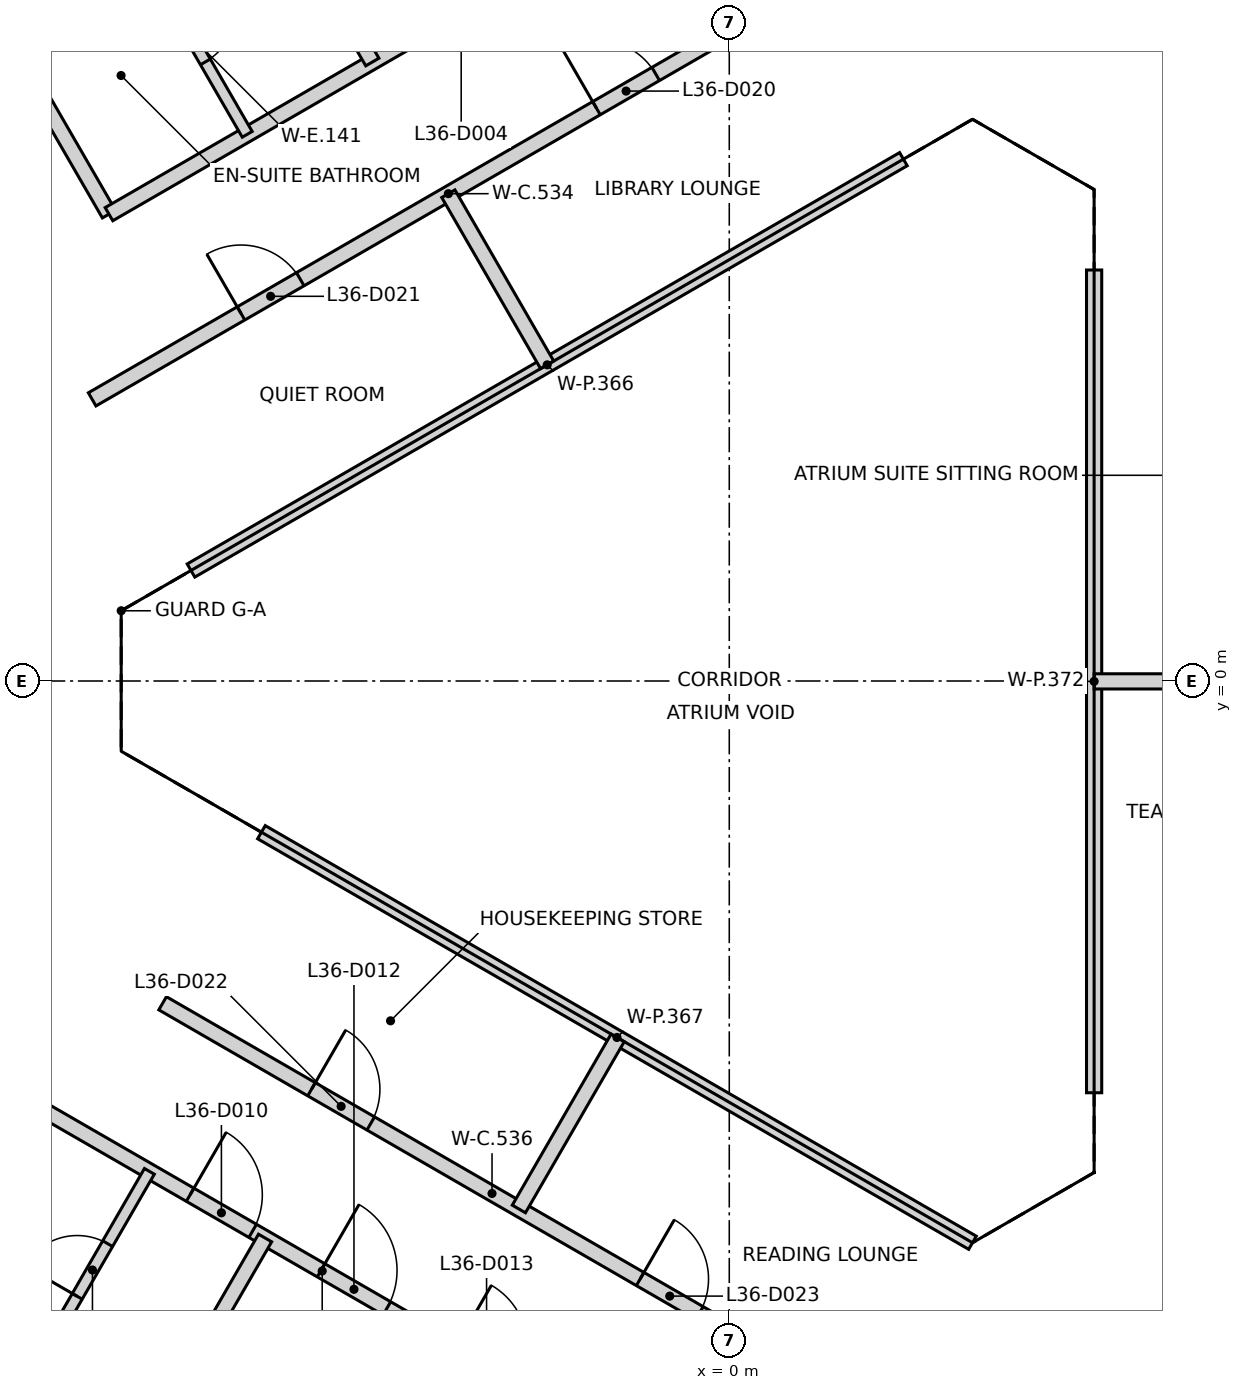
"""IFC4 building model, lengths in metres.
Left out: names, types, materials, properties, quantities, classifications, styles, units other than length and angle.
Written with IfcOpenShell. Run it as: python <this file> out.ifc"""

import sys

from ifc_helpers import new_model, si_unit, direction, frame, frame_2d, origin, place, context, subcontext, project, spatial, rectangle, extrude, element, fill, save


model = new_model("IFC4")
c1 = context("Model", 3, precision=1e-05, world=origin(), true_north=direction((0.0, 1.0)))
c2 = subcontext(c1, "Body", "Model", "MODEL_VIEW")
j1 = project(units=[si_unit("LENGTHUNIT", "METRE"), si_unit("PLANEANGLEUNIT", "RADIAN")], contexts=[c1])
p1 = place(None, origin())
s1 = spatial("IfcSite", under=j1, at=p1, CompositionType="ELEMENT")
p2 = place(p1, origin())
s2 = spatial("IfcBuilding", under=s1, at=p2, CompositionType="ELEMENT")
p3 = place(p2, frame((0.0, 0.0, 146.8)))
s3 = spatial("IfcBuildingStorey", under=s2, at=p3, CompositionType="ELEMENT", Elevation=146.8)
p4 = place(p3, frame((10.42, 6.498, 0.0), z_axis=(0.0, 0.0, 1.0), x_axis=(-0.866021906294, 0.500006057782, 0.0)))
e1 = element("IfcWall", 1, at=p4, inside=s3, PredefinedType="SHEAR", context=c2, shape_type="SweptSolid", body=[
    extrude(rectangle(XDim=11.55, YDim=0.25, at=frame_2d((5.775, 0.0))), origin(), (0.0, 0.0, 1.0), 3.2),
])
p5 = place(p4, frame((10.025, 0.0, 0.0)))
e2 = element("IfcOpeningElement", 2, at=p5, cuts=e1, PredefinedType="OPENING", context=c2, shape_type="SweptSolid", body=[
    extrude(rectangle(XDim=1.2, YDim=2.1, at=frame_2d((0.6, 1.05))), frame((0.0, 0.135, 0.0), z_axis=(0.0, -1.0, 0.0), x_axis=(1.0, 0.0, 0.0)), (0.0, 0.0, 1.0), 0.27),
])
p6 = place(p4, frame((8.725, 0.0, 0.0)))
e3 = element("IfcOpeningElement", 3, at=p6, cuts=e1, PredefinedType="OPENING", context=c2, shape_type="SweptSolid", body=[
    extrude(rectangle(XDim=1.2, YDim=2.1, at=frame_2d((0.6, 1.05))), frame((0.0, 0.135, 0.0), z_axis=(0.0, -1.0, 0.0), x_axis=(1.0, 0.0, 0.0)), (0.0, 0.0, 1.0), 0.27),
])
p7 = place(p3, frame((0.417, -12.273, 0.0), z_axis=(0.0, 0.0, 1.0), x_axis=(0.866021906294, 0.500006057782, 0.0)))
e4 = element("IfcWall", 4, at=p7, inside=s3, PredefinedType="SHEAR", context=c2, shape_type="SweptSolid", body=[
    extrude(rectangle(XDim=11.55, YDim=0.25, at=frame_2d((5.775, 0.0))), origin(), (0.0, 0.0, 1.0), 3.2),
])
p8 = place(p7, frame((10.025, 0.0, 0.0)))
e5 = element("IfcOpeningElement", 5, at=p8, cuts=e4, PredefinedType="OPENING", context=c2, shape_type="SweptSolid", body=[
    extrude(rectangle(XDim=1.2, YDim=2.1, at=frame_2d((0.6, 1.05))), frame((0.0, 0.135, 0.0), z_axis=(0.0, -1.0, 0.0), x_axis=(1.0, 0.0, 0.0)), (0.0, 0.0, 1.0), 0.27),
])
p9 = place(p7, frame((8.725, 0.0, 0.0)))
e6 = element("IfcOpeningElement", 6, at=p9, cuts=e4, PredefinedType="OPENING", context=c2, shape_type="SweptSolid", body=[
    extrude(rectangle(XDim=1.2, YDim=2.1, at=frame_2d((0.6, 1.05))), frame((0.0, 0.135, 0.0), z_axis=(0.0, -1.0, 0.0), x_axis=(1.0, 0.0, 0.0)), (0.0, 0.0, 1.0), 0.27),
])
p10 = place(p3, frame((-9.447, -5.4, 0.0), z_axis=(0.0, 0.0, 1.0), x_axis=(0.866101262146, -0.49986858644, 0.0)))
e7 = element("IfcWall", 7, at=p10, inside=s3, PredefinedType="PARTITIONING", context=c2, shape_type="SweptSolid", body=[
    extrude(rectangle(XDim=9.449, YDim=0.2, at=frame_2d((4.724, 0.0))), origin(), (0.0, 0.0, 1.0), 3.2),
])
p11 = place(p10, frame((2.718, 0.0, 0.0)))
e8 = element("IfcOpeningElement", 8, at=p11, cuts=e7, PredefinedType="OPENING", context=c2, shape_type="SweptSolid", body=[
    extrude(rectangle(XDim=0.95, YDim=2.1, at=frame_2d((0.475, 1.05))), frame((0.0, 0.11, 0.0), z_axis=(0.0, -1.0, 0.0), x_axis=(1.0, 0.0, 0.0)), (0.0, 0.0, 1.0), 0.22),
])
p12 = place(p10, frame((4.707, 0.0, 0.0)))
e9 = element("IfcOpeningElement", 9, at=p12, cuts=e7, PredefinedType="OPENING", context=c2, shape_type="SweptSolid", body=[
    extrude(rectangle(XDim=1.0, YDim=2.1, at=frame_2d((0.5, 1.05))), frame((0.0, 0.11, 0.0), z_axis=(0.0, -1.0, 0.0), x_axis=(1.0, 0.0, 0.0)), (0.0, 0.0, 1.0), 0.22),
])
p13 = place(p10, frame((6.746, 0.0, 0.0)))
e10 = element("IfcOpeningElement", 10, at=p13, cuts=e7, PredefinedType="OPENING", context=c2, shape_type="SweptSolid", body=[
    extrude(rectangle(XDim=0.95, YDim=2.1, at=frame_2d((0.475, 1.05))), frame((0.0, 0.11, 0.0), z_axis=(0.0, -1.0, 0.0), x_axis=(1.0, 0.0, 0.0)), (0.0, 0.0, 1.0), 0.22),
])
p14 = place(p3, frame((-9.033, 7.651, 0.0), z_axis=(0.0, 0.0, 1.0), x_axis=(0.500417633986, -0.865784148386, 0.0)))
e11 = element("IfcWall", 11, at=p14, inside=s3, PredefinedType="PARTITIONING", context=c2, shape_type="SweptSolid", body=[
    extrude(rectangle(XDim=1.743, YDim=0.2, at=frame_2d((0.871, 0.0))), origin(), (0.0, 0.0, 1.0), 3.2),
])
p15 = place(p3, frame((-8.382, 3.705, 0.0), z_axis=(0.0, 0.0, 1.0), x_axis=(0.866012036978, 0.500023151273, 0.0)))
e12 = element("IfcWall", 12, at=p15, inside=s3, PredefinedType="PARTITIONING", context=c2, shape_type="SweptSolid", body=[
    extrude(rectangle(XDim=10.823, YDim=0.2, at=frame_2d((5.412, 0.0))), origin(), (0.0, 0.0, 1.0), 3.2),
])
p16 = place(p15, frame((7.661, 0.0, 0.0)))
e13 = element("IfcOpeningElement", 13, at=p16, cuts=e12, PredefinedType="OPENING", context=c2, shape_type="SweptSolid", body=[
    extrude(rectangle(XDim=0.9, YDim=2.1, at=frame_2d((0.45, 1.05))), frame((0.0, 0.11, 0.0), z_axis=(0.0, -1.0, 0.0), x_axis=(1.0, 0.0, 0.0)), (0.0, 0.0, 1.0), 0.22),
])
p17 = place(p15, frame((2.261, 0.0, 0.0)))
e14 = element("IfcOpeningElement", 14, at=p17, cuts=e12, PredefinedType="OPENING", context=c2, shape_type="SweptSolid", body=[
    extrude(rectangle(XDim=0.9, YDim=2.1, at=frame_2d((0.45, 1.05))), frame((0.0, 0.11, 0.0), z_axis=(0.0, -1.0, 0.0), x_axis=(1.0, 0.0, 0.0)), (0.0, 0.0, 1.0), 0.22),
])
p18 = place(p3, frame((-8.161, 6.142, 0.0), z_axis=(0.0, 0.0, 1.0), x_axis=(0.865927304867, 0.500169873828, 0.0)))
e15 = element("IfcWall", 15, at=p18, inside=s3, PredefinedType="PARTITIONING", context=c2, shape_type="SweptSolid", body=[
    extrude(rectangle(XDim=9.478, YDim=0.2, at=frame_2d((4.739, 0.0))), origin(), (0.0, 0.0, 1.0), 3.2),
])
p19 = place(p18, frame((4.851, 0.0, 0.0)))
e16 = element("IfcOpeningElement", 16, at=p19, cuts=e15, PredefinedType="OPENING", context=c2, shape_type="SweptSolid", body=[
    extrude(rectangle(XDim=1.0, YDim=2.1, at=frame_2d((0.5, 1.05))), frame((0.0, 0.11, 0.0), z_axis=(0.0, -1.0, 0.0), x_axis=(1.0, 0.0, 0.0)), (0.0, 0.0, 1.0), 0.22),
])
p20 = place(p18, frame((7.583, 0.0, 0.0)))
e17 = element("IfcOpeningElement", 17, at=p20, cuts=e15, PredefinedType="OPENING", context=c2, shape_type="SweptSolid", body=[
    extrude(rectangle(XDim=1.0, YDim=2.1, at=frame_2d((0.5, 1.05))), frame((0.0, 0.11, 0.0), z_axis=(0.0, -1.0, 0.0), x_axis=(1.0, 0.0, 0.0)), (0.0, 0.0, 1.0), 0.22),
])
p21 = place(p3, frame((-7.455, -4.24, 0.0), z_axis=(0.0, 0.0, 1.0), x_axis=(0.866015783746, -0.500016662025, 0.0)))
e18 = element("IfcWall", 18, at=p21, inside=s3, PredefinedType="PARTITIONING", context=c2, shape_type="SweptSolid", body=[
    extrude(rectangle(XDim=10.009, YDim=0.2, at=frame_2d((5.004, 0.0))), origin(), (0.0, 0.0, 1.0), 3.2),
])
p22 = place(p21, frame((2.262, 0.0, 0.0)))
e19 = element("IfcOpeningElement", 19, at=p22, cuts=e18, PredefinedType="OPENING", context=c2, shape_type="SweptSolid", body=[
    extrude(rectangle(XDim=0.9, YDim=2.1, at=frame_2d((0.45, 1.05))), frame((0.0, 0.11, 0.0), z_axis=(0.0, -1.0, 0.0), x_axis=(1.0, 0.0, 0.0)), (0.0, 0.0, 1.0), 0.22),
])
p23 = place(p21, frame((7.254, 0.0, 0.0)))
e20 = element("IfcOpeningElement", 20, at=p23, cuts=e18, PredefinedType="OPENING", context=c2, shape_type="SweptSolid", body=[
    extrude(rectangle(XDim=0.9, YDim=2.1, at=frame_2d((0.45, 1.05))), frame((0.0, 0.11, 0.0), z_axis=(0.0, -1.0, 0.0), x_axis=(1.0, 0.0, 0.0)), (0.0, 0.0, 1.0), 0.22),
])
p24 = place(p3, frame((-12.22, -17.917, 0.0), z_axis=(0.0, 0.0, 1.0), x_axis=(0.499963860175, 0.866046268117, 0.0)))
e21 = element("IfcWall", 21, at=p24, inside=s3, PredefinedType="PARTITIONING", context=c2, shape_type="SweptSolid", body=[
    extrude(rectangle(XDim=12.227, YDim=0.2, at=frame_2d((6.114, 0.0))), origin(), (0.0, 0.0, 1.0), 2.3),
])
p25 = place(p3, frame((-10.809, 18.731, 0.0), z_axis=(0.0, 0.0, 1.0), x_axis=(0.500004774777, -0.866022647048, 0.0)))
e22 = element("IfcWall", 22, at=p25, inside=s3, PredefinedType="PARTITIONING", context=c2, shape_type="SweptSolid", body=[
    extrude(rectangle(XDim=12.227, YDim=0.2, at=frame_2d((6.113, 0.0))), origin(), (0.0, 0.0, 1.0), 2.3),
])
p26 = place(p3, frame((-7.082, 1.453, 0.0), z_axis=(0.0, 0.0, 1.0), x_axis=(0.866010525116, 0.500025769724, 0.0)))
e23 = element("IfcWall", 23, at=p26, inside=s3, PredefinedType="PARTITIONING", context=c2, shape_type="SweptSolid", body=[
    extrude(rectangle(XDim=10.823, YDim=0.2, at=frame_2d((5.411, 0.0))), origin(), (0.0, 0.0, 1.0), 2.3),
])
p27 = place(p3, frame((-6.155, -1.989, 0.0), z_axis=(0.0, 0.0, 1.0), x_axis=(0.866009062299, -0.500028303215, 0.0)))
e24 = element("IfcWall", 24, at=p27, inside=s3, PredefinedType="PARTITIONING", context=c2, shape_type="SweptSolid", body=[
    extrude(rectangle(XDim=10.802, YDim=0.2, at=frame_2d((5.401, 0.0))), origin(), (0.0, 0.0, 1.0), 2.3),
])
p28 = place(p3, frame((-3.696, 6.411, 0.0), z_axis=(0.0, 0.0, 1.0), x_axis=(0.500006934395, -0.866021400173, 0.0)))
e25 = element("IfcWall", 25, at=p28, inside=s3, PredefinedType="PARTITIONING", context=c2, shape_type="SweptSolid", body=[
    extrude(rectangle(XDim=2.6, YDim=0.2, at=frame_2d((1.3, 0.0))), origin(), (0.0, 0.0, 1.0), 2.3),
])
p29 = place(p3, frame((-2.768, -6.946, 0.0), z_axis=(0.0, 0.0, 1.0), x_axis=(0.500017832597, 0.866015107885, 0.0)))
e26 = element("IfcWall", 26, at=p29, inside=s3, PredefinedType="PARTITIONING", context=c2, shape_type="SweptSolid", body=[
    extrude(rectangle(XDim=2.6, YDim=0.2, at=frame_2d((1.3, 0.0))), origin(), (0.0, 0.0, 1.0), 2.3),
])
p30 = place(p3, frame((4.8, -5.417, 0.0), z_axis=(0.0, 0.0, 1.0), x_axis=(0.0, 1.0, 0.0)))
e27 = element("IfcWall", 27, at=p30, inside=s3, PredefinedType="PARTITIONING", context=c2, shape_type="SweptSolid", body=[
    extrude(rectangle(XDim=10.824, YDim=0.2, at=frame_2d((5.412, 0.0))), origin(), (0.0, 0.0, 1.0), 2.3),
])
p31 = place(p3, frame((4.8, -0.005, 0.0), z_axis=(0.0, 0.0, 1.0), x_axis=(1.0, 0.0, 0.0)))
e28 = element("IfcWall", 28, at=p31, inside=s3, PredefinedType="PARTITIONING", context=c2, shape_type="SweptSolid", body=[
    extrude(rectangle(XDim=2.505, YDim=0.2, at=frame_2d((1.252, 0.0))), origin(), (0.0, 0.0, 1.0), 2.3),
])
p32 = place(p3, frame((-9.127, -9.046, 0.0), z_axis=(0.0, 0.0, 1.0), x_axis=(0.499959910729, 0.866048548099, 0.0)))
e29 = element("IfcWall", 29, at=p32, inside=s3, PredefinedType="PARTITIONING", context=c2, shape_type="SweptSolid", body=[
    extrude(rectangle(XDim=2.996, YDim=0.15, at=frame_2d((1.498, 0.0))), origin(), (0.0, 0.0, 1.0), 3.2),
])
p33 = place(p32, frame((1.098, 0.0, 0.0)))
e30 = element("IfcOpeningElement", 30, at=p33, cuts=e29, PredefinedType="OPENING", context=c2, shape_type="SweptSolid", body=[
    extrude(rectangle(XDim=0.8, YDim=2.1, at=frame_2d((0.4, 1.05))), frame((0.0, 0.085, 0.0), z_axis=(0.0, -1.0, 0.0), x_axis=(1.0, 0.0, 0.0)), (0.0, 0.0, 1.0), 0.17),
])
p34 = place(p3, frame((-7.843, 9.79, 0.0), z_axis=(0.0, 0.0, 1.0), x_axis=(0.500234218456, -0.865890135459, 0.0)))
e31 = element("IfcWall", 31, at=p34, inside=s3, PredefinedType="PARTITIONING", context=c2, shape_type="SweptSolid", body=[
    extrude(rectangle(XDim=3.0, YDim=0.15, at=frame_2d((1.5, 0.0))), origin(), (0.0, 0.0, 1.0), 3.2),
])
p35 = place(p34, frame((1.1, 0.0, 0.0)))
e32 = element("IfcOpeningElement", 32, at=p35, cuts=e31, PredefinedType="OPENING", context=c2, shape_type="SweptSolid", body=[
    extrude(rectangle(XDim=0.8, YDim=2.1, at=frame_2d((0.4, 1.05))), frame((0.0, 0.085, 0.0), z_axis=(0.0, -1.0, 0.0), x_axis=(1.0, 0.0, 0.0)), (0.0, 0.0, 1.0), 0.17),
])
p36 = place(p35, frame((0.8, 0.0, 0.0), z_axis=(0.0, 0.0, 1.0), x_axis=(-1.0, 0.0, 0.0)))
e33 = element("IfcDoor", 33, at=p36, inside=s3, OperationType="SINGLE_SWING_LEFT", PredefinedType="DOOR", context=c2, shape_type="SweptSolid", body=[
    extrude(rectangle(XDim=0.8, YDim=2.1, at=frame_2d((0.4, 1.05))), frame((0.0, 0.025, 0.0), z_axis=(0.0, -1.0, 0.0), x_axis=(1.0, 0.0, 0.0)), (0.0, 0.0, 1.0), 0.05),
])
fill(e32, e33)
p37 = place(p11, frame((0.95, 0.0, 0.0), z_axis=(0.0, 0.0, 1.0), x_axis=(-1.0, 0.0, 0.0)))
e34 = element("IfcDoor", 34, at=p37, inside=s3, OperationType="SINGLE_SWING_LEFT", PredefinedType="DOOR", context=c2, shape_type="SweptSolid", body=[
    extrude(rectangle(XDim=0.95, YDim=2.1, at=frame_2d((0.475, 1.05))), frame((0.0, 0.025, 0.0), z_axis=(0.0, -1.0, 0.0), x_axis=(1.0, 0.0, 0.0)), (0.0, 0.0, 1.0), 0.05),
])
fill(e8, e34)
p38 = place(p33, origin())
e35 = element("IfcDoor", 35, at=p38, inside=s3, OperationType="SINGLE_SWING_LEFT", PredefinedType="DOOR", context=c2, shape_type="SweptSolid", body=[
    extrude(rectangle(XDim=0.8, YDim=2.1, at=frame_2d((0.4, 1.05))), frame((0.0, 0.025, 0.0), z_axis=(0.0, -1.0, 0.0), x_axis=(1.0, 0.0, 0.0)), (0.0, 0.0, 1.0), 0.05),
])
fill(e30, e35)
p39 = place(p12, frame((1.0, 0.0, 0.0), z_axis=(0.0, 0.0, 1.0), x_axis=(-1.0, 0.0, 0.0)))
e36 = element("IfcDoor", 36, at=p39, inside=s3, OperationType="SINGLE_SWING_LEFT", PredefinedType="DOOR", context=c2, shape_type="SweptSolid", body=[
    extrude(rectangle(XDim=1.0, YDim=2.1, at=frame_2d((0.5, 1.05))), frame((0.0, 0.025, 0.0), z_axis=(0.0, -1.0, 0.0), x_axis=(1.0, 0.0, 0.0)), (0.0, 0.0, 1.0), 0.05),
])
fill(e9, e36)
p40 = place(p16, frame((0.9, 0.0, 0.0), z_axis=(0.0, 0.0, 1.0), x_axis=(-1.0, 0.0, 0.0)))
e37 = element("IfcDoor", 37, at=p40, inside=s3, OperationType="SINGLE_SWING_LEFT", PredefinedType="DOOR", context=c2, shape_type="SweptSolid", body=[
    extrude(rectangle(XDim=0.9, YDim=2.1, at=frame_2d((0.45, 1.05))), frame((0.0, 0.025, 0.0), z_axis=(0.0, -1.0, 0.0), x_axis=(1.0, 0.0, 0.0)), (0.0, 0.0, 1.0), 0.05),
])
fill(e13, e37)
p41 = place(p17, frame((0.9, 0.0, 0.0), z_axis=(0.0, 0.0, 1.0), x_axis=(-1.0, 0.0, 0.0)))
e38 = element("IfcDoor", 38, at=p41, inside=s3, OperationType="SINGLE_SWING_LEFT", PredefinedType="DOOR", context=c2, shape_type="SweptSolid", body=[
    extrude(rectangle(XDim=0.9, YDim=2.1, at=frame_2d((0.45, 1.05))), frame((0.0, 0.025, 0.0), z_axis=(0.0, -1.0, 0.0), x_axis=(1.0, 0.0, 0.0)), (0.0, 0.0, 1.0), 0.05),
])
fill(e14, e38)
p42 = place(p22, origin())
e39 = element("IfcDoor", 39, at=p42, inside=s3, OperationType="SINGLE_SWING_LEFT", PredefinedType="DOOR", context=c2, shape_type="SweptSolid", body=[
    extrude(rectangle(XDim=0.9, YDim=2.1, at=frame_2d((0.45, 1.05))), frame((0.0, 0.025, 0.0), z_axis=(0.0, -1.0, 0.0), x_axis=(1.0, 0.0, 0.0)), (0.0, 0.0, 1.0), 0.05),
])
fill(e19, e39)
p43 = place(p23, origin())
e40 = element("IfcDoor", 40, at=p43, inside=s3, OperationType="SINGLE_SWING_LEFT", PredefinedType="DOOR", context=c2, shape_type="SweptSolid", body=[
    extrude(rectangle(XDim=0.9, YDim=2.1, at=frame_2d((0.45, 1.05))), frame((0.0, 0.025, 0.0), z_axis=(0.0, -1.0, 0.0), x_axis=(1.0, 0.0, 0.0)), (0.0, 0.0, 1.0), 0.05),
])
fill(e20, e40)
save(model, sys.argv[1])
